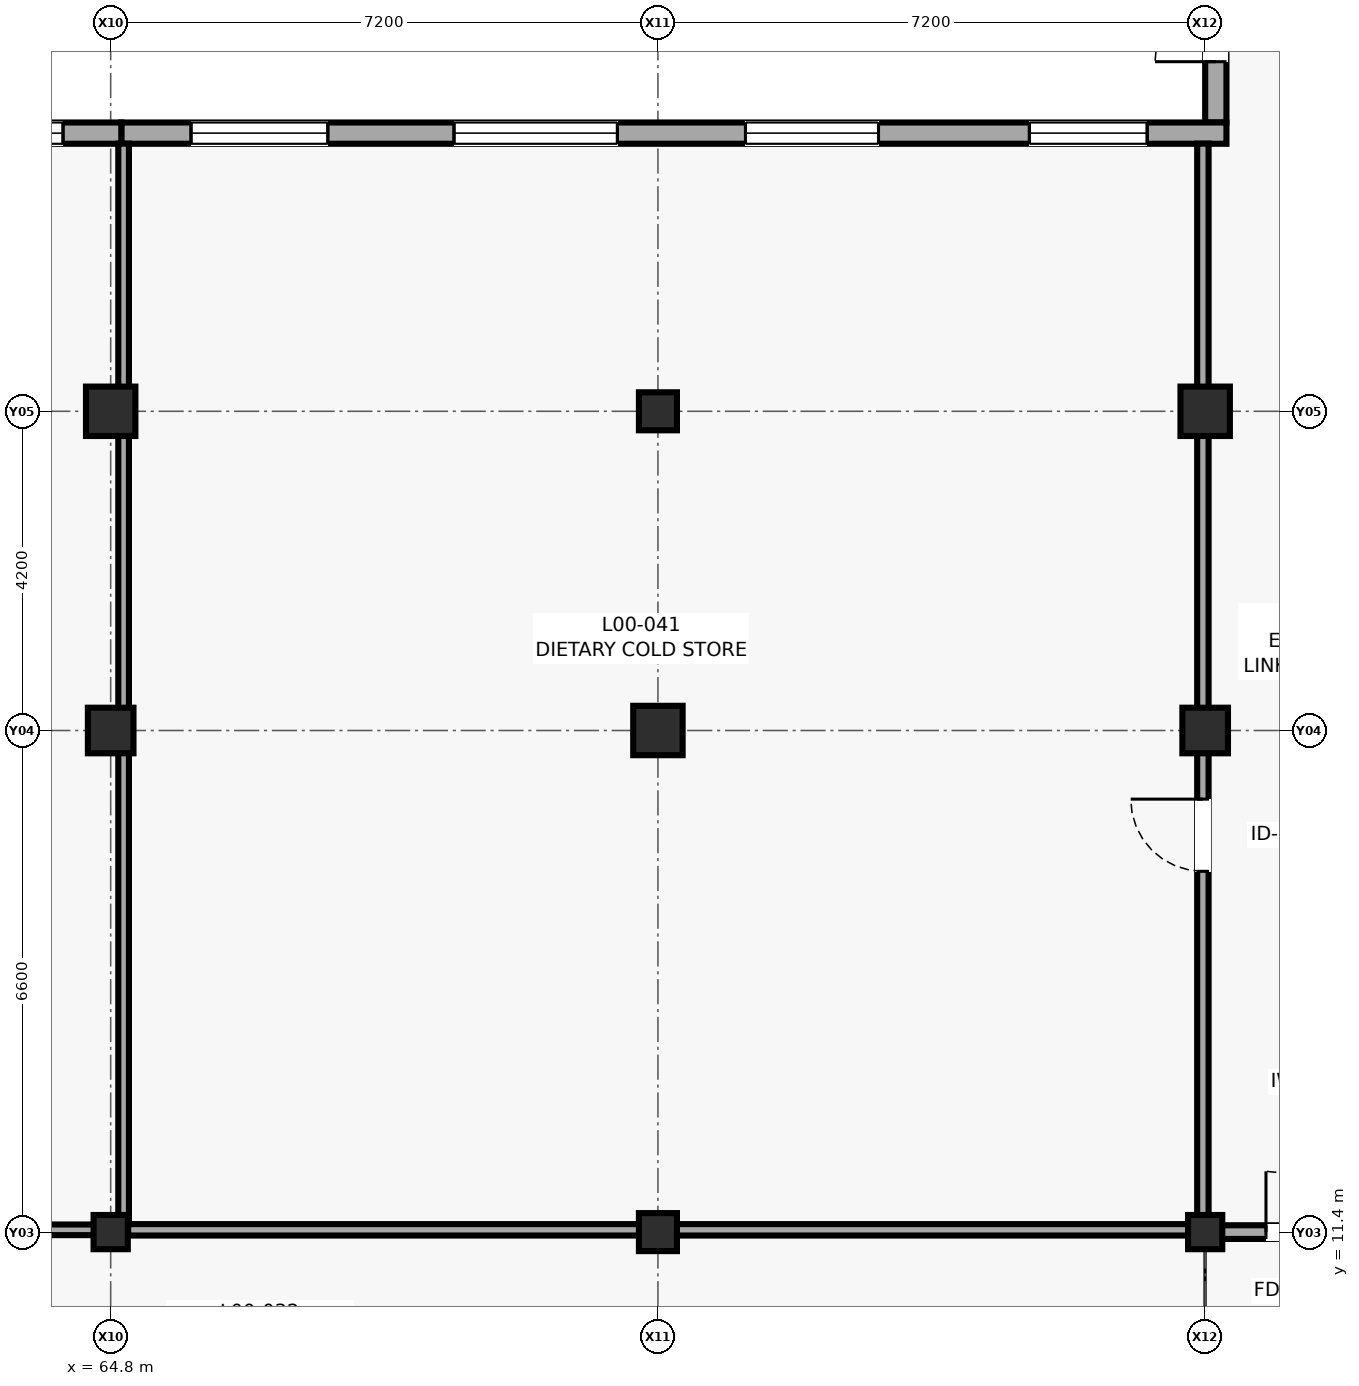
"""IFC4 building model, lengths in metres.
Left out: names, types, materials, properties, quantities, classifications, styles, units other than length and angle.
Written with IfcOpenShell. Run it as: python <this file> out.ifc"""

import sys

from ifc_helpers import new_model, si_unit, direction, frame, frame_2d, origin, origin_2d, place, context, subcontext, project, spatial, rectangle, extrude, element, fill, save


model = new_model("IFC4")
c1 = context("Model", 3, precision=1e-05, world=origin(), true_north=direction((0.0, 1.0)))
c2 = subcontext(c1, "Body", "Model", "MODEL_VIEW")
j1 = project(units=[si_unit("LENGTHUNIT", "METRE"), si_unit("PLANEANGLEUNIT", "RADIAN")], contexts=[c1])
p1 = place(None, origin())
s1 = spatial("IfcSite", under=j1, at=p1, CompositionType="ELEMENT")
p2 = place(p1, origin())
s2 = spatial("IfcBuilding", under=s1, at=p2, CompositionType="ELEMENT")
p3 = place(p2, origin())
s3 = spatial("IfcBuildingStorey", under=s2, at=p3, CompositionType="ELEMENT", Elevation=0.0)
p4 = place(p3, frame((64.8, 11.4, 0.0), z_axis=(0.0, 0.0, 1.0), x_axis=(1.0, 0.0, 0.0)))
e1 = element("IfcColumn", 1, at=p4, inside=s3, PredefinedType="COLUMN", context=c2, shape_type="SweptSolid", body=[
    extrude(rectangle(XDim=0.45, YDim=0.45, at=origin_2d()), origin(), (0.0, 0.0, 1.0), 4.2),
])
p5 = place(p3, frame((64.8, 18.0, 0.0), z_axis=(0.0, 0.0, 1.0), x_axis=(1.0, 0.0, 0.0)))
e2 = element("IfcColumn", 2, at=p5, inside=s3, PredefinedType="COLUMN", context=c2, shape_type="SweptSolid", body=[
    extrude(rectangle(XDim=0.6, YDim=0.6, at=origin_2d()), origin(), (0.0, 0.0, 1.0), 4.2),
])
p6 = place(p3, frame((64.8, 22.2, 0.0), z_axis=(0.0, 0.0, 1.0), x_axis=(1.0, 0.0, 0.0)))
e3 = element("IfcColumn", 3, at=p6, inside=s3, PredefinedType="COLUMN", context=c2, shape_type="SweptSolid", body=[
    extrude(rectangle(XDim=0.65, YDim=0.65, at=origin_2d()), origin(), (0.0, 0.0, 1.0), 4.2),
])
p7 = place(p3, frame((72.0, 11.4, 0.0), z_axis=(0.0, 0.0, 1.0), x_axis=(1.0, 0.0, 0.0)))
e4 = element("IfcColumn", 4, at=p7, inside=s3, PredefinedType="COLUMN", context=c2, shape_type="SweptSolid", body=[
    extrude(rectangle(XDim=0.5, YDim=0.5, at=origin_2d()), origin(), (0.0, 0.0, 1.0), 4.2),
])
p8 = place(p3, frame((72.0, 18.0, 0.0), z_axis=(0.0, 0.0, 1.0), x_axis=(1.0, 0.0, 0.0)))
e5 = element("IfcColumn", 5, at=p8, inside=s3, PredefinedType="COLUMN", context=c2, shape_type="SweptSolid", body=[
    extrude(rectangle(XDim=0.65, YDim=0.65, at=origin_2d()), origin(), (0.0, 0.0, 1.0), 4.2),
])
p9 = place(p3, frame((72.0, 22.2, 0.0), z_axis=(0.0, 0.0, 1.0), x_axis=(1.0, 0.0, 0.0)))
e6 = element("IfcColumn", 6, at=p9, inside=s3, PredefinedType="COLUMN", context=c2, shape_type="SweptSolid", body=[
    extrude(rectangle(XDim=0.5, YDim=0.5, at=origin_2d()), origin(), (0.0, 0.0, 1.0), 4.2),
])
p10 = place(p3, frame((79.2, 11.4, 0.0), z_axis=(0.0, 0.0, 1.0), x_axis=(1.0, 0.0, 0.0)))
e7 = element("IfcColumn", 7, at=p10, inside=s3, PredefinedType="COLUMN", context=c2, shape_type="SweptSolid", body=[
    extrude(rectangle(XDim=0.45, YDim=0.45, at=origin_2d()), origin(), (0.0, 0.0, 1.0), 4.2),
])
p11 = place(p3, frame((79.2, 18.0, 0.0), z_axis=(0.0, 0.0, 1.0), x_axis=(1.0, 0.0, 0.0)))
e8 = element("IfcColumn", 8, at=p11, inside=s3, PredefinedType="COLUMN", context=c2, shape_type="SweptSolid", body=[
    extrude(rectangle(XDim=0.6, YDim=0.6, at=origin_2d()), origin(), (0.0, 0.0, 1.0), 4.2),
])
p12 = place(p3, frame((79.2, 22.2, 0.0), z_axis=(0.0, 0.0, 1.0), x_axis=(1.0, 0.0, 0.0)))
e9 = element("IfcColumn", 9, at=p12, inside=s3, PredefinedType="COLUMN", context=c2, shape_type="SweptSolid", body=[
    extrude(rectangle(XDim=0.65, YDim=0.65, at=origin_2d()), origin(), (0.0, 0.0, 1.0), 4.2),
])
p13 = place(p3, frame((79.34, 42.0, 0.0), z_axis=(0.0, 0.0, 1.0), x_axis=(0.0, -1.0, 0.0)))
e10 = element("IfcWall", 10, at=p13, inside=s3, PredefinedType="SOLIDWALL", context=c2, shape_type="SweptSolid", body=[
    extrude(rectangle(XDim=16.0, YDim=0.28, at=frame_2d((8.0, 0.0))), origin(), (0.0, 0.0, 1.0), 3.375),
])
p14 = place(p13, frame((13.6, 0.0, 0.0)))
e11 = element("IfcOpeningElement", 11, at=p14, cuts=e10, PredefinedType="OPENING", context=c2, shape_type="SweptSolid", body=[
    extrude(rectangle(XDim=1.6, YDim=2.3, at=frame_2d((0.8, 1.15))), frame((0.0, 0.15, 0.0), z_axis=(0.0, -1.0, 0.0), x_axis=(1.0, 0.0, 0.0)), (0.0, 0.0, 1.0), 0.3),
])
p15 = place(p13, frame((9.175, 0.0, 0.85)))
e12 = element("IfcOpeningElement", 12, at=p15, cuts=e10, PredefinedType="OPENING", context=c2, shape_type="SweptSolid", body=[
    extrude(rectangle(XDim=1.65, YDim=1.95, at=frame_2d((0.825, 0.975))), frame((0.0, 0.15, 0.0), z_axis=(0.0, -1.0, 0.0), x_axis=(1.0, 0.0, 0.0)), (0.0, 0.0, 1.0), 0.3),
])
p16 = place(p3, frame((79.48, 25.86, 0.0), z_axis=(0.0, 0.0, 1.0), x_axis=(-1.0, 0.0, 0.0)))
e13 = element("IfcWall", 13, at=p16, inside=s3, PredefinedType="SOLIDWALL", context=c2, shape_type="SweptSolid", body=[
    extrude(rectangle(XDim=14.54, YDim=0.28, at=frame_2d((7.27, 0.0))), origin(), (0.0, 0.0, 1.0), 3.98),
])
p17 = place(p16, frame((1.043, 0.0, 0.85)))
e14 = element("IfcOpeningElement", 14, at=p17, cuts=e13, PredefinedType="OPENING", context=c2, shape_type="SweptSolid", body=[
    extrude(rectangle(XDim=1.55, YDim=1.85, at=frame_2d((0.775, 0.925))), frame((0.0, 0.15, 0.0), z_axis=(0.0, -1.0, 0.0), x_axis=(1.0, 0.0, 0.0)), (0.0, 0.0, 1.0), 0.3),
])
p18 = place(p16, frame((4.578, 0.0, 0.75)))
e15 = element("IfcOpeningElement", 15, at=p18, cuts=e13, PredefinedType="OPENING", context=c2, shape_type="SweptSolid", body=[
    extrude(rectangle(XDim=1.75, YDim=2.05, at=frame_2d((0.875, 1.025))), frame((0.0, 0.15, 0.0), z_axis=(0.0, -1.0, 0.0), x_axis=(1.0, 0.0, 0.0)), (0.0, 0.0, 1.0), 0.3),
])
p19 = place(p16, frame((8.013, 0.0, 0.85)))
e16 = element("IfcOpeningElement", 16, at=p19, cuts=e13, PredefinedType="OPENING", context=c2, shape_type="SweptSolid", body=[
    extrude(rectangle(XDim=2.15, YDim=1.95, at=frame_2d((1.075, 0.975))), frame((0.0, 0.15, 0.0), z_axis=(0.0, -1.0, 0.0), x_axis=(1.0, 0.0, 0.0)), (0.0, 0.0, 1.0), 0.3),
])
p20 = place(p16, frame((11.823, 0.0, 0.85)))
e17 = element("IfcOpeningElement", 17, at=p20, cuts=e13, PredefinedType="OPENING", context=c2, shape_type="SweptSolid", body=[
    extrude(rectangle(XDim=1.8, YDim=1.8, at=frame_2d((0.9, 0.9))), frame((0.0, 0.15, 0.0), z_axis=(0.0, -1.0, 0.0), x_axis=(1.0, 0.0, 0.0)), (0.0, 0.0, 1.0), 0.3),
])
p21 = place(p3, frame((64.94, 25.86, 0.0), z_axis=(0.0, 0.0, 1.0), x_axis=(-1.0, 0.0, 0.0)))
e18 = element("IfcWall", 18, at=p21, inside=s3, PredefinedType="SOLIDWALL", context=c2, shape_type="SweptSolid", body=[
    extrude(rectangle(XDim=14.54, YDim=0.28, at=frame_2d((7.27, 0.0))), origin(), (0.0, 0.0, 1.0), 3.98),
])
p22 = place(p21, frame((0.767, 0.0, 0.85)))
e19 = element("IfcOpeningElement", 19, at=p22, cuts=e18, PredefinedType="OPENING", context=c2, shape_type="SweptSolid", body=[
    extrude(rectangle(XDim=2.1, YDim=1.8, at=frame_2d((1.05, 0.9))), frame((0.0, 0.15, 0.0), z_axis=(0.0, -1.0, 0.0), x_axis=(1.0, 0.0, 0.0)), (0.0, 0.0, 1.0), 0.3),
])
p23 = place(p21, frame((4.252, 0.0, 0.85)))
e20 = element("IfcOpeningElement", 20, at=p23, cuts=e18, PredefinedType="OPENING", context=c2, shape_type="SweptSolid", body=[
    extrude(rectangle(XDim=2.4, YDim=1.85, at=frame_2d((1.2, 0.925))), frame((0.0, 0.15, 0.0), z_axis=(0.0, -1.0, 0.0), x_axis=(1.0, 0.0, 0.0)), (0.0, 0.0, 1.0), 0.3),
])
p24 = place(p21, frame((8.337, 0.0, 0.85)))
e21 = element("IfcOpeningElement", 21, at=p24, cuts=e18, PredefinedType="OPENING", context=c2, shape_type="SweptSolid", body=[
    extrude(rectangle(XDim=1.5, YDim=1.65, at=frame_2d((0.75, 0.825))), frame((0.0, 0.15, 0.0), z_axis=(0.0, -1.0, 0.0), x_axis=(1.0, 0.0, 0.0)), (0.0, 0.0, 1.0), 0.3),
])
p25 = place(p21, frame((12.123, 0.0, 0.85)))
e22 = element("IfcOpeningElement", 22, at=p25, cuts=e18, PredefinedType="OPENING", context=c2, shape_type="SweptSolid", body=[
    extrude(rectangle(XDim=1.2, YDim=1.65, at=frame_2d((0.6, 0.825))), frame((0.0, 0.15, 0.0), z_axis=(0.0, -1.0, 0.0), x_axis=(1.0, 0.0, 0.0)), (0.0, 0.0, 1.0), 0.3),
])
p26 = place(p3, frame((79.05, 11.4, 0.0), z_axis=(0.0, 0.0, 1.0), x_axis=(1.0, 0.0, 0.0)))
e23 = element("IfcWall", 23, at=p26, inside=s3, PredefinedType="PARTITIONING", context=c2, shape_type="SweptSolid", body=[
    extrude(rectangle(XDim=3.5, YDim=0.18, at=frame_2d((1.75, 0.0))), origin(), (0.0, 0.0, 1.0), 3.255),
])
p27 = place(p26, frame((0.95, 0.0, 0.0)))
e24 = element("IfcOpeningElement", 24, at=p27, cuts=e23, PredefinedType="OPENING", context=c2, shape_type="SweptSolid", body=[
    extrude(rectangle(XDim=1.6, YDim=2.25, at=frame_2d((0.8, 1.125))), frame((0.0, 0.1, 0.0), z_axis=(0.0, -1.0, 0.0), x_axis=(1.0, 0.0, 0.0)), (0.0, 0.0, 1.0), 0.2),
])
p28 = place(p3, frame((50.678, 11.43, 0.0), z_axis=(0.0, 0.0, 1.0), x_axis=(1.0, 0.0, 0.0)))
e25 = element("IfcWall", 25, at=p28, inside=s3, PredefinedType="PARTITIONING", context=c2, shape_type="SweptSolid", body=[
    extrude(rectangle(XDim=14.292, YDim=0.14, at=frame_2d((7.146, 0.0))), origin(), (0.0, 0.0, 1.0), 3.105),
])
p29 = place(p28, frame((4.425, 0.0, 0.0)))
e26 = element("IfcOpeningElement", 26, at=p29, cuts=e25, PredefinedType="OPENING", context=c2, shape_type="SweptSolid", body=[
    extrude(rectangle(XDim=1.65, YDim=2.32, at=frame_2d((0.825, 1.16))), frame((0.0, 0.08, 0.0), z_axis=(0.0, -1.0, 0.0), x_axis=(1.0, 0.0, 0.0)), (0.0, 0.0, 1.0), 0.16),
])
p30 = place(p3, frame((64.97, 11.498, 0.0), z_axis=(0.0, 0.0, 1.0), x_axis=(0.0, 1.0, 0.0)))
e27 = element("IfcWall", 27, at=p30, inside=s3, PredefinedType="PARTITIONING", context=c2, shape_type="SweptSolid", body=[
    extrude(rectangle(XDim=14.224, YDim=0.14, at=frame_2d((7.112, 0.0))), origin(), (0.0, 0.0, 1.0), 3.405),
])
p31 = place(p3, frame((65.03, 11.43, 0.0), z_axis=(0.0, 0.0, 1.0), x_axis=(1.0, 0.0, 0.0)))
e28 = element("IfcWall", 28, at=p31, inside=s3, PredefinedType="PARTITIONING", context=c2, shape_type="SweptSolid", body=[
    extrude(rectangle(XDim=14.14, YDim=0.15, at=frame_2d((7.07, 0.0))), origin(), (0.0, 0.0, 1.0), 3.055),
])
p32 = place(p3, frame((79.17, 11.503, 0.0), z_axis=(0.0, 0.0, 1.0), x_axis=(0.0, 1.0, 0.0)))
e29 = element("IfcWall", 29, at=p32, inside=s3, PredefinedType="PARTITIONING", context=c2, shape_type="SweptSolid", body=[
    extrude(rectangle(XDim=14.219, YDim=0.15, at=frame_2d((7.109, 0.0))), origin(), (0.0, 0.0, 1.0), 3.355),
])
p33 = place(p32, frame((4.644, 0.0, 0.0)))
e30 = element("IfcOpeningElement", 30, at=p33, cuts=e29, PredefinedType="OPENING", context=c2, shape_type="SweptSolid", body=[
    extrude(rectangle(XDim=0.95, YDim=2.1, at=frame_2d((0.475, 1.05))), frame((0.0, 0.085, 0.0), z_axis=(0.0, -1.0, 0.0), x_axis=(1.0, 0.0, 0.0)), (0.0, 0.0, 1.0), 0.17),
])
p34 = place(p14, frame((1.6, 0.0, 0.0), z_axis=(0.0, 0.0, 1.0), x_axis=(-1.0, 0.0, 0.0)))
e31 = element("IfcDoor", 31, at=p34, inside=s3, OperationType="DOUBLE_DOOR_SINGLE_SWING", PredefinedType="DOOR", context=c2, shape_type="SweptSolid", body=[
    extrude(rectangle(XDim=1.6, YDim=2.3, at=frame_2d((0.8, 1.15))), frame((0.0, 0.025, 0.0), z_axis=(0.0, -1.0, 0.0), x_axis=(1.0, 0.0, 0.0)), (0.0, 0.0, 1.0), 0.05),
])
fill(e11, e31)
p35 = place(p17, origin())
e32 = element("IfcWindow", 32, at=p35, inside=s3, PartitioningType="SINGLE_PANEL", PredefinedType="WINDOW", context=c2, shape_type="SweptSolid", body=[
    extrude(rectangle(XDim=1.55, YDim=1.85, at=frame_2d((0.775, 0.925))), frame((0.0, 0.03, 0.0), z_axis=(0.0, -1.0, 0.0), x_axis=(1.0, 0.0, 0.0)), (0.0, 0.0, 1.0), 0.06),
])
fill(e14, e32)
p36 = place(p18, origin())
e33 = element("IfcWindow", 33, at=p36, inside=s3, PartitioningType="SINGLE_PANEL", PredefinedType="WINDOW", context=c2, shape_type="SweptSolid", body=[
    extrude(rectangle(XDim=1.75, YDim=2.05, at=frame_2d((0.875, 1.025))), frame((0.0, 0.03, 0.0), z_axis=(0.0, -1.0, 0.0), x_axis=(1.0, 0.0, 0.0)), (0.0, 0.0, 1.0), 0.06),
])
fill(e15, e33)
p37 = place(p19, origin())
e34 = element("IfcWindow", 34, at=p37, inside=s3, PartitioningType="SINGLE_PANEL", PredefinedType="WINDOW", context=c2, shape_type="SweptSolid", body=[
    extrude(rectangle(XDim=2.15, YDim=1.95, at=frame_2d((1.075, 0.975))), frame((0.0, 0.03, 0.0), z_axis=(0.0, -1.0, 0.0), x_axis=(1.0, 0.0, 0.0)), (0.0, 0.0, 1.0), 0.06),
])
fill(e16, e34)
p38 = place(p20, origin())
e35 = element("IfcWindow", 35, at=p38, inside=s3, PartitioningType="SINGLE_PANEL", PredefinedType="WINDOW", context=c2, shape_type="SweptSolid", body=[
    extrude(rectangle(XDim=1.8, YDim=1.8, at=frame_2d((0.9, 0.9))), frame((0.0, 0.03, 0.0), z_axis=(0.0, -1.0, 0.0), x_axis=(1.0, 0.0, 0.0)), (0.0, 0.0, 1.0), 0.06),
])
fill(e17, e35)
p39 = place(p22, origin())
e36 = element("IfcWindow", 36, at=p39, inside=s3, PartitioningType="SINGLE_PANEL", PredefinedType="WINDOW", context=c2, shape_type="SweptSolid", body=[
    extrude(rectangle(XDim=2.1, YDim=1.8, at=frame_2d((1.05, 0.9))), frame((0.0, 0.03, 0.0), z_axis=(0.0, -1.0, 0.0), x_axis=(1.0, 0.0, 0.0)), (0.0, 0.0, 1.0), 0.06),
])
fill(e19, e36)
p40 = place(p27, origin())
e37 = element("IfcDoor", 37, at=p40, inside=s3, OperationType="DOUBLE_DOOR_SINGLE_SWING", PredefinedType="DOOR", context=c2, shape_type="SweptSolid", body=[
    extrude(rectangle(XDim=1.6, YDim=2.25, at=frame_2d((0.8, 1.125))), frame((0.0, 0.025, 0.0), z_axis=(0.0, -1.0, 0.0), x_axis=(1.0, 0.0, 0.0)), (0.0, 0.0, 1.0), 0.05),
])
fill(e24, e37)
p41 = place(p33, origin())
e38 = element("IfcDoor", 38, at=p41, inside=s3, OperationType="SINGLE_SWING_RIGHT", PredefinedType="DOOR", context=c2, shape_type="SweptSolid", body=[
    extrude(rectangle(XDim=0.95, YDim=2.1, at=frame_2d((0.475, 1.05))), frame((0.0, 0.025, 0.0), z_axis=(0.0, -1.0, 0.0), x_axis=(1.0, 0.0, 0.0)), (0.0, 0.0, 1.0), 0.05),
])
fill(e30, e38)
save(model, sys.argv[1])
